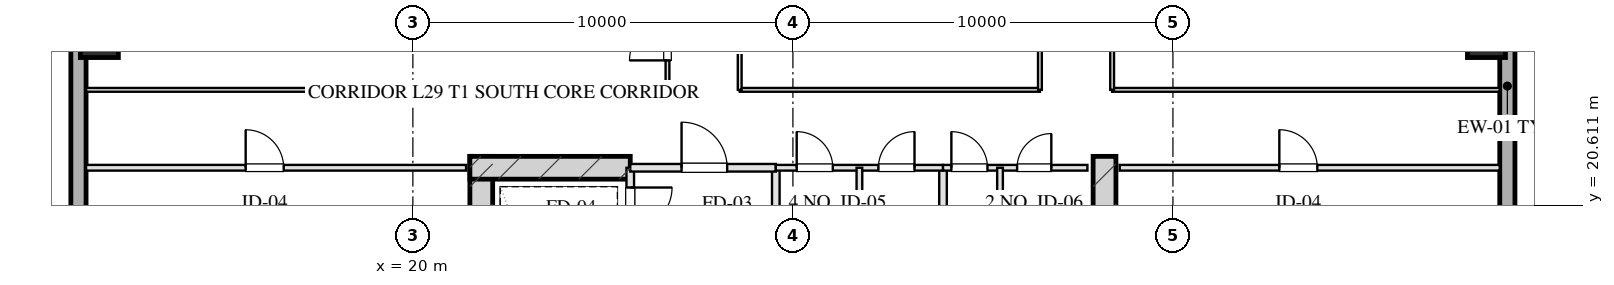
"""IFC4 building model, lengths in metres.
Left out: names, types, materials, properties, quantities, classifications, styles, units other than length and angle.
Written with IfcOpenShell. Run it as: python <this file> out.ifc"""

import sys

from ifc_helpers import new_model, si_unit, direction, frame, frame_2d, origin, origin_2d, place, context, subcontext, project, spatial, rectangle, hollow_rectangle, extrude, element, fill, save


model = new_model("IFC4")
c1 = context("Model", 3, precision=1e-05, world=origin(), true_north=direction((0.0, 1.0)))
c2 = subcontext(c1, "Body", "Model", "MODEL_VIEW")
j1 = project(units=[si_unit("LENGTHUNIT", "METRE"), si_unit("PLANEANGLEUNIT", "RADIAN")], contexts=[c1])
p1 = place(None, origin())
s1 = spatial("IfcSite", under=j1, at=p1, CompositionType="ELEMENT")
p2 = place(p1, origin())
s2 = spatial("IfcBuilding", under=s1, at=p2, CompositionType="ELEMENT")
p3 = place(p2, frame((0.0, 0.0, 113.85)))
s3 = spatial("IfcBuildingStorey", under=s2, at=p3, CompositionType="ELEMENT", Elevation=113.85)
for number, where, z_axis, x_axis in (
    (1, (21.8, 21.9, 0.0), (0.0, 0.0, 1.0), (0.0, -1.0, 0.0)),
    (2, (38.2, 21.9, 0.0), (0.0, 0.0, 1.0), (0.0, -1.0, 0.0)),
):
    element("IfcWall", number, at=place(p3, frame(where, z_axis=z_axis, x_axis=x_axis)), inside=s3, PredefinedType="SHEAR", context=c2, shape_type="SweptSolid", body=[
        extrude(rectangle(XDim=9.48, YDim=0.6, at=frame_2d((4.74, 0.0))), origin(), (0.0, 0.0, 1.0), 3.45),
    ])
p4 = place(p3, frame((21.5, 21.6, 0.0), z_axis=(0.0, 0.0, 1.0), x_axis=(1.0, 0.0, 0.0)))
e3 = element("IfcWall", 3, at=p4, inside=s3, PredefinedType="SHEAR", context=c2, shape_type="SweptSolid", body=[
    extrude(rectangle(XDim=4.22, YDim=0.6, at=frame_2d((2.11, 0.0))), origin(), (0.0, 0.0, 1.0), 3.45),
])
for number, where, z_axis, x_axis in (
    (4, (11.75, 25.0, 0.0), (0.0, 0.0, 1.0), (1.0, 0.0, 0.0)),
    (5, (48.25, 25.0, 0.0), (0.0, 0.0, 1.0), (1.0, 0.0, 0.0)),
):
    element("IfcColumn", number, at=place(p3, frame(where, z_axis=z_axis, x_axis=x_axis)), inside=s3, PredefinedType="COLUMN", context=c2, shape_type="SweptSolid", body=[
        extrude(hollow_rectangle(XDim=1.0, YDim=1.0, WallThickness=0.036, at=origin_2d()), origin(), (0.0, 0.0, 1.0), 3.451),
    ])
p5 = place(p3, frame((11.2, 9.0, 0.0), z_axis=(0.0, 0.0, 1.0), x_axis=(0.0, 1.0, 0.0)))
e6 = element("IfcWall", 6, at=p5, inside=s3, PredefinedType="SOLIDWALL", context=c2, shape_type="SweptSolid", body=[
    extrude(rectangle(XDim=50.0, YDim=0.4, at=frame_2d((25.0, 0.0))), origin(), (0.0, 0.0, 1.0), 2.61),
])
p6 = place(p5, frame((27.336, 0.0, 0.0)))
e7 = element("IfcOpeningElement", 7, at=p6, cuts=e6, PredefinedType="OPENING", context=c2, shape_type="SweptSolid", body=[
    extrude(rectangle(XDim=1.1, YDim=2.15, at=frame_2d((0.55, 1.075))), frame((0.0, 0.21, 0.0), z_axis=(0.0, -1.0, 0.0), x_axis=(1.0, 0.0, 0.0)), (0.0, 0.0, 1.0), 0.42),
])
p7 = place(p3, frame((48.8, 59.0, 0.0), z_axis=(0.0, 0.0, 1.0), x_axis=(0.0, -1.0, 0.0)))
e8 = element("IfcWall", 8, at=p7, inside=s3, PredefinedType="SOLIDWALL", context=c2, shape_type="SweptSolid", body=[
    extrude(rectangle(XDim=50.0, YDim=0.4, at=frame_2d((25.0, 0.0))), origin(), (0.0, 0.0, 1.0), 2.61),
])
p8 = place(p7, frame((30.2, 0.0, 0.75)))
e9 = element("IfcOpeningElement", 9, at=p8, cuts=e8, PredefinedType="OPENING", context=c2, shape_type="SweptSolid", body=[
    extrude(rectangle(XDim=2.4, YDim=1.46, at=frame_2d((1.2, 0.73))), frame((0.0, 0.21, 0.0), z_axis=(0.0, -1.0, 0.0), x_axis=(1.0, 0.0, 0.0)), (0.0, 0.0, 1.0), 0.42),
])
p9 = place(p7, frame((18.65, 0.0, 0.0)))
e10 = element("IfcOpeningElement", 10, at=p9, cuts=e8, PredefinedType="OPENING", context=c2, shape_type="SweptSolid", body=[
    extrude(rectangle(XDim=1.1, YDim=2.15, at=frame_2d((0.55, 1.075))), frame((0.0, 0.21, 0.0), z_axis=(0.0, -1.0, 0.0), x_axis=(1.0, 0.0, 0.0)), (0.0, 0.0, 1.0), 0.42),
])
p10 = place(p3, frame((25.72, 21.6, 0.0), z_axis=(0.0, 0.0, 1.0), x_axis=(0.0, -1.0, 0.0)))
e11 = element("IfcWall", 11, at=p10, inside=s3, PredefinedType="PARTITIONING", context=c2, shape_type="SweptSolid", body=[
    extrude(rectangle(XDim=1.9, YDim=0.2, at=frame_2d((0.95, 0.0))), origin(), (0.0, 0.0, 1.0), 3.175),
])
p11 = place(p10, frame((0.52, 0.0, 0.0)))
e12 = element("IfcOpeningElement", 12, at=p11, cuts=e11, PredefinedType="OPENING", context=c2, shape_type="SweptSolid", body=[
    extrude(rectangle(XDim=1.1, YDim=2.05, at=frame_2d((0.55, 1.025))), frame((0.0, 0.11, 0.0), z_axis=(0.0, -1.0, 0.0), x_axis=(1.0, 0.0, 0.0)), (0.0, 0.0, 1.0), 0.22),
])
p12 = place(p3, frame((29.55, 21.6, 0.0), z_axis=(0.0, 0.0, 1.0), x_axis=(0.0, -1.0, 0.0)))
e13 = element("IfcWall", 13, at=p12, inside=s3, PredefinedType="PARTITIONING", context=c2, shape_type="SweptSolid", body=[
    extrude(rectangle(XDim=8.43, YDim=0.2, at=frame_2d((4.215, 0.0))), origin(), (0.0, 0.0, 1.0), 3.175),
])
p13 = place(p3, frame((25.72, 21.6, 0.0), z_axis=(0.0, 0.0, 1.0), x_axis=(1.0, 0.0, 0.0)))
e14 = element("IfcWall", 14, at=p13, inside=s3, PredefinedType="PARTITIONING", context=c2, shape_type="SweptSolid", body=[
    extrude(rectangle(XDim=3.83, YDim=0.2, at=frame_2d((1.915, 0.0))), origin(), (0.0, 0.0, 1.0), 3.175),
])
p14 = place(p13, frame((1.35, 0.0, 0.0)))
e15 = element("IfcOpeningElement", 15, at=p14, cuts=e14, PredefinedType="OPENING", context=c2, shape_type="SweptSolid", body=[
    extrude(rectangle(XDim=1.2, YDim=2.05, at=frame_2d((0.6, 1.025))), frame((0.0, 0.11, 0.0), z_axis=(0.0, -1.0, 0.0), x_axis=(1.0, 0.0, 0.0)), (0.0, 0.0, 1.0), 0.22),
])
p15 = place(p3, frame((33.95, 21.6, 0.0), z_axis=(0.0, 0.0, 1.0), x_axis=(0.0, -1.0, 0.0)))
e16 = element("IfcWall", 16, at=p15, inside=s3, PredefinedType="PARTITIONING", context=c2, shape_type="SweptSolid", body=[
    extrude(rectangle(XDim=8.43, YDim=0.2, at=frame_2d((4.215, 0.0))), origin(), (0.0, 0.0, 1.0), 3.175),
])
p16 = place(p3, frame((29.55, 21.6, 0.0), z_axis=(0.0, 0.0, 1.0), x_axis=(1.0, 0.0, 0.0)))
e17 = element("IfcWall", 17, at=p16, inside=s3, PredefinedType="PARTITIONING", context=c2, shape_type="SweptSolid", body=[
    extrude(rectangle(XDim=4.4, YDim=0.15, at=frame_2d((2.2, 0.0))), origin(), (0.0, 0.0, 1.0), 3.175),
])
p17 = place(p16, frame((0.55, 0.0, 0.0)))
e18 = element("IfcOpeningElement", 18, at=p17, cuts=e17, PredefinedType="OPENING", context=c2, shape_type="SweptSolid", body=[
    extrude(rectangle(XDim=0.95, YDim=2.05, at=frame_2d((0.475, 1.025))), frame((0.0, 0.085, 0.0), z_axis=(0.0, -1.0, 0.0), x_axis=(1.0, 0.0, 0.0)), (0.0, 0.0, 1.0), 0.17),
])
p18 = place(p16, frame((2.7, 0.0, 0.0)))
e19 = element("IfcOpeningElement", 19, at=p18, cuts=e17, PredefinedType="OPENING", context=c2, shape_type="SweptSolid", body=[
    extrude(rectangle(XDim=0.95, YDim=2.05, at=frame_2d((0.475, 1.025))), frame((0.0, 0.085, 0.0), z_axis=(0.0, -1.0, 0.0), x_axis=(1.0, 0.0, 0.0)), (0.0, 0.0, 1.0), 0.17),
])
p19 = place(p3, frame((31.75, 21.6, 0.0), z_axis=(0.0, 0.0, 1.0), x_axis=(0.0, -1.0, 0.0)))
e20 = element("IfcWall", 20, at=p19, inside=s3, PredefinedType="PARTITIONING", context=c2, shape_type="SweptSolid", body=[
    extrude(rectangle(XDim=8.43, YDim=0.15, at=frame_2d((4.215, 0.0))), origin(), (0.0, 0.0, 1.0), 3.175),
])
p20 = place(p3, frame((33.95, 21.6, 0.0), z_axis=(0.0, 0.0, 1.0), x_axis=(1.0, 0.0, 0.0)))
e21 = element("IfcWall", 21, at=p20, inside=s3, PredefinedType="PARTITIONING", context=c2, shape_type="SweptSolid", body=[
    extrude(rectangle(XDim=3.8, YDim=0.15, at=frame_2d((1.9, 0.0))), origin(), (0.0, 0.0, 1.0), 3.175),
])
p21 = place(p20, frame((0.22, 0.0, 0.0)))
e22 = element("IfcOpeningElement", 22, at=p21, cuts=e21, PredefinedType="OPENING", context=c2, shape_type="SweptSolid", body=[
    extrude(rectangle(XDim=0.95, YDim=2.05, at=frame_2d((0.475, 1.025))), frame((0.0, 0.085, 0.0), z_axis=(0.0, -1.0, 0.0), x_axis=(1.0, 0.0, 0.0)), (0.0, 0.0, 1.0), 0.17),
])
p22 = place(p20, frame((1.95, 0.0, 0.0)))
e23 = element("IfcOpeningElement", 23, at=p22, cuts=e21, PredefinedType="OPENING", context=c2, shape_type="SweptSolid", body=[
    extrude(rectangle(XDim=0.9, YDim=2.05, at=frame_2d((0.45, 1.025))), frame((0.0, 0.085, 0.0), z_axis=(0.0, -1.0, 0.0), x_axis=(1.0, 0.0, 0.0)), (0.0, 0.0, 1.0), 0.17),
])
p23 = place(p3, frame((35.45, 21.6, 0.0), z_axis=(0.0, 0.0, 1.0), x_axis=(0.0, -1.0, 0.0)))
e24 = element("IfcWall", 24, at=p23, inside=s3, PredefinedType="PARTITIONING", context=c2, shape_type="SweptSolid", body=[
    extrude(rectangle(XDim=8.43, YDim=0.15, at=frame_2d((4.215, 0.0))), origin(), (0.0, 0.0, 1.0), 2.815),
])
p24 = place(p23, frame((2.55, 0.0, 0.0)))
e25 = element("IfcOpeningElement", 25, at=p24, cuts=e24, PredefinedType="OPENING", context=c2, shape_type="SweptSolid", body=[
    extrude(rectangle(XDim=0.95, YDim=2.05, at=frame_2d((0.475, 1.025))), frame((0.0, 0.085, 0.0), z_axis=(0.0, -1.0, 0.0), x_axis=(1.0, 0.0, 0.0)), (0.0, 0.0, 1.0), 0.17),
])
p25 = place(p23, frame((5.6, 0.0, 0.0)))
e26 = element("IfcOpeningElement", 26, at=p25, cuts=e24, PredefinedType="OPENING", context=c2, shape_type="SweptSolid", body=[
    extrude(rectangle(XDim=0.9, YDim=2.05, at=frame_2d((0.45, 1.025))), frame((0.0, 0.085, 0.0), z_axis=(0.0, -1.0, 0.0), x_axis=(1.0, 0.0, 0.0)), (0.0, 0.0, 1.0), 0.17),
])
p26 = place(p3, frame((11.4, 21.6, 0.0), z_axis=(0.0, 0.0, 1.0), x_axis=(1.0, 0.0, 0.0)))
e27 = element("IfcWall", 27, at=p26, inside=s3, PredefinedType="PARTITIONING", context=c2, shape_type="SweptSolid", body=[
    extrude(rectangle(XDim=10.0, YDim=0.15, at=frame_2d((5.0, 0.0))), origin(), (0.0, 0.0, 1.0), 3.175),
])
p27 = place(p26, frame((4.2, 0.0, 0.0)))
e28 = element("IfcOpeningElement", 28, at=p27, cuts=e27, PredefinedType="OPENING", context=c2, shape_type="SweptSolid", body=[
    extrude(rectangle(XDim=1.0, YDim=2.05, at=frame_2d((0.5, 1.025))), frame((0.0, 0.085, 0.0), z_axis=(0.0, -1.0, 0.0), x_axis=(1.0, 0.0, 0.0)), (0.0, 0.0, 1.0), 0.17),
])
p28 = place(p3, frame((38.6, 21.6, 0.0), z_axis=(0.0, 0.0, 1.0), x_axis=(1.0, 0.0, 0.0)))
e29 = element("IfcWall", 29, at=p28, inside=s3, PredefinedType="PARTITIONING", context=c2, shape_type="SweptSolid", body=[
    extrude(rectangle(XDim=10.0, YDim=0.15, at=frame_2d((5.0, 0.0))), origin(), (0.0, 0.0, 1.0), 3.175),
])
p29 = place(p28, frame((4.2, 0.0, 0.0)))
e30 = element("IfcOpeningElement", 30, at=p29, cuts=e29, PredefinedType="OPENING", context=c2, shape_type="SweptSolid", body=[
    extrude(rectangle(XDim=1.0, YDim=2.05, at=frame_2d((0.5, 1.025))), frame((0.0, 0.085, 0.0), z_axis=(0.0, -1.0, 0.0), x_axis=(1.0, 0.0, 0.0)), (0.0, 0.0, 1.0), 0.17),
])
p30 = place(p3, frame((11.4, 23.65, 0.0), z_axis=(0.0, 0.0, 1.0), x_axis=(1.0, 0.0, 0.0)))
e31 = element("IfcWall", 31, at=p30, inside=s3, PredefinedType="MOVABLE", context=c2, shape_type="SweptSolid", body=[
    extrude(rectangle(XDim=15.3, YDim=0.1, at=frame_2d((7.65, 0.0))), origin(), (0.0, 0.0, 1.0), 3.175),
])
p31 = place(p3, frame((28.6, 23.65, 0.0), z_axis=(0.0, 0.0, 1.0), x_axis=(1.0, 0.0, 0.0)))
e32 = element("IfcWall", 32, at=p31, inside=s3, PredefinedType="MOVABLE", context=c2, shape_type="SweptSolid", body=[
    extrude(rectangle(XDim=7.9, YDim=0.1, at=frame_2d((3.95, 0.0))), origin(), (0.0, 0.0, 1.0), 3.175),
])
p32 = place(p3, frame((38.4, 23.65, 0.0), z_axis=(0.0, 0.0, 1.0), x_axis=(1.0, 0.0, 0.0)))
e33 = element("IfcWall", 33, at=p32, inside=s3, PredefinedType="MOVABLE", context=c2, shape_type="SweptSolid", body=[
    extrude(rectangle(XDim=10.2, YDim=0.1, at=frame_2d((5.1, 0.0))), origin(), (0.0, 0.0, 1.0), 3.175),
])
p33 = place(p3, frame((26.7, 23.65, 0.0), z_axis=(0.0, 0.0, 1.0), x_axis=(0.0, 1.0, 0.0)))
e34 = element("IfcWall", 34, at=p33, inside=s3, PredefinedType="MOVABLE", context=c2, shape_type="SweptSolid", body=[
    extrude(rectangle(XDim=20.7, YDim=0.1, at=frame_2d((10.35, 0.0))), origin(), (0.0, 0.0, 1.0), 3.175),
])
p34 = place(p33, frame((0.775, 0.0, 0.0)))
e35 = element("IfcOpeningElement", 35, at=p34, cuts=e34, PredefinedType="OPENING", context=c2, shape_type="SweptSolid", body=[
    extrude(rectangle(XDim=1.0, YDim=2.05, at=frame_2d((0.5, 1.025))), frame((0.0, 0.06, 0.0), z_axis=(0.0, -1.0, 0.0), x_axis=(1.0, 0.0, 0.0)), (0.0, 0.0, 1.0), 0.12),
])
p35 = place(p33, frame((3.95, 0.0, 0.0)))
e36 = element("IfcOpeningElement", 36, at=p35, cuts=e34, PredefinedType="OPENING", context=c2, shape_type="SweptSolid", body=[
    extrude(rectangle(XDim=1.0, YDim=2.05, at=frame_2d((0.5, 1.025))), frame((0.0, 0.06, 0.0), z_axis=(0.0, -1.0, 0.0), x_axis=(1.0, 0.0, 0.0)), (0.0, 0.0, 1.0), 0.12),
])
p36 = place(p33, frame((8.273, 0.0, 0.0)))
e37 = element("IfcOpeningElement", 37, at=p36, cuts=e34, PredefinedType="OPENING", context=c2, shape_type="SweptSolid", body=[
    extrude(rectangle(XDim=1.0, YDim=2.05, at=frame_2d((0.5, 1.025))), frame((0.0, 0.06, 0.0), z_axis=(0.0, -1.0, 0.0), x_axis=(1.0, 0.0, 0.0)), (0.0, 0.0, 1.0), 0.12),
])
p37 = place(p33, frame((12.559, 0.0, 0.0)))
e38 = element("IfcOpeningElement", 38, at=p37, cuts=e34, PredefinedType="OPENING", context=c2, shape_type="SweptSolid", body=[
    extrude(rectangle(XDim=0.85, YDim=2.05, at=frame_2d((0.425, 1.025))), frame((0.0, 0.06, 0.0), z_axis=(0.0, -1.0, 0.0), x_axis=(1.0, 0.0, 0.0)), (0.0, 0.0, 1.0), 0.12),
])
p38 = place(p33, frame((16.078, 0.0, 0.0)))
e39 = element("IfcOpeningElement", 39, at=p38, cuts=e34, PredefinedType="OPENING", context=c2, shape_type="SweptSolid", body=[
    extrude(rectangle(XDim=1.0, YDim=2.05, at=frame_2d((0.5, 1.025))), frame((0.0, 0.06, 0.0), z_axis=(0.0, -1.0, 0.0), x_axis=(1.0, 0.0, 0.0)), (0.0, 0.0, 1.0), 0.12),
])
p39 = place(p33, frame((18.967, 0.0, 0.0)))
e40 = element("IfcOpeningElement", 40, at=p39, cuts=e34, PredefinedType="OPENING", context=c2, shape_type="SweptSolid", body=[
    extrude(rectangle(XDim=1.0, YDim=2.05, at=frame_2d((0.5, 1.025))), frame((0.0, 0.06, 0.0), z_axis=(0.0, -1.0, 0.0), x_axis=(1.0, 0.0, 0.0)), (0.0, 0.0, 1.0), 0.12),
])
p40 = place(p3, frame((28.6, 23.65, 0.0), z_axis=(0.0, 0.0, 1.0), x_axis=(0.0, 1.0, 0.0)))
e41 = element("IfcWall", 41, at=p40, inside=s3, PredefinedType="MOVABLE", context=c2, shape_type="SweptSolid", body=[
    extrude(rectangle(XDim=20.7, YDim=0.1, at=frame_2d((10.35, 0.0))), origin(), (0.0, 0.0, 1.0), 3.175),
])
p41 = place(p40, frame((5.198, 0.0, 0.0)))
e42 = element("IfcOpeningElement", 42, at=p41, cuts=e41, PredefinedType="OPENING", context=c2, shape_type="SweptSolid", body=[
    extrude(rectangle(XDim=1.1, YDim=2.05, at=frame_2d((0.55, 1.025))), frame((0.0, 0.06, 0.0), z_axis=(0.0, -1.0, 0.0), x_axis=(1.0, 0.0, 0.0)), (0.0, 0.0, 1.0), 0.12),
])
p42 = place(p40, frame((15.667, 0.0, 0.0)))
e43 = element("IfcOpeningElement", 43, at=p42, cuts=e41, PredefinedType="OPENING", context=c2, shape_type="SweptSolid", body=[
    extrude(rectangle(XDim=1.1, YDim=2.05, at=frame_2d((0.55, 1.025))), frame((0.0, 0.06, 0.0), z_axis=(0.0, -1.0, 0.0), x_axis=(1.0, 0.0, 0.0)), (0.0, 0.0, 1.0), 0.12),
])
p43 = place(p3, frame((36.5, 23.65, 0.0), z_axis=(0.0, 0.0, 1.0), x_axis=(0.0, 1.0, 0.0)))
e44 = element("IfcWall", 44, at=p43, inside=s3, PredefinedType="MOVABLE", context=c2, shape_type="SweptSolid", body=[
    extrude(rectangle(XDim=20.7, YDim=0.1, at=frame_2d((10.35, 0.0))), origin(), (0.0, 0.0, 1.0), 3.175),
])
p44 = place(p3, frame((38.4, 23.65, 0.0), z_axis=(0.0, 0.0, 1.0), x_axis=(0.0, 1.0, 0.0)))
e45 = element("IfcWall", 45, at=p44, inside=s3, PredefinedType="MOVABLE", context=c2, shape_type="SweptSolid", body=[
    extrude(rectangle(XDim=20.7, YDim=0.1, at=frame_2d((10.35, 0.0))), origin(), (0.0, 0.0, 1.0), 3.175),
])
p45 = place(p44, frame((2.699, 0.0, 0.0)))
e46 = element("IfcOpeningElement", 46, at=p45, cuts=e45, PredefinedType="OPENING", context=c2, shape_type="SweptSolid", body=[
    extrude(rectangle(XDim=1.0, YDim=2.05, at=frame_2d((0.5, 1.025))), frame((0.0, 0.06, 0.0), z_axis=(0.0, -1.0, 0.0), x_axis=(1.0, 0.0, 0.0)), (0.0, 0.0, 1.0), 0.12),
])
p46 = place(p44, frame((9.875, 0.0, 0.0)))
e47 = element("IfcOpeningElement", 47, at=p46, cuts=e45, PredefinedType="OPENING", context=c2, shape_type="SweptSolid", body=[
    extrude(rectangle(XDim=1.0, YDim=2.05, at=frame_2d((0.5, 1.025))), frame((0.0, 0.06, 0.0), z_axis=(0.0, -1.0, 0.0), x_axis=(1.0, 0.0, 0.0)), (0.0, 0.0, 1.0), 0.12),
])
p47 = place(p44, frame((17.025, 0.0, 0.0)))
e48 = element("IfcOpeningElement", 48, at=p47, cuts=e45, PredefinedType="OPENING", context=c2, shape_type="SweptSolid", body=[
    extrude(rectangle(XDim=1.0, YDim=2.05, at=frame_2d((0.5, 1.025))), frame((0.0, 0.06, 0.0), z_axis=(0.0, -1.0, 0.0), x_axis=(1.0, 0.0, 0.0)), (0.0, 0.0, 1.0), 0.12),
])
p48 = place(p11, origin())
e49 = element("IfcDoor", 49, at=p48, inside=s3, OperationType="SINGLE_SWING_LEFT", PredefinedType="DOOR", context=c2, shape_type="SweptSolid", body=[
    extrude(rectangle(XDim=1.1, YDim=2.05, at=frame_2d((0.55, 1.025))), frame((0.0, 0.025, 0.0), z_axis=(0.0, -1.0, 0.0), x_axis=(1.0, 0.0, 0.0)), (0.0, 0.0, 1.0), 0.05),
])
fill(e12, e49)
p49 = place(p14, origin())
e50 = element("IfcDoor", 50, at=p49, inside=s3, OperationType="SINGLE_SWING_LEFT", PredefinedType="DOOR", context=c2, shape_type="SweptSolid", body=[
    extrude(rectangle(XDim=1.2, YDim=2.05, at=frame_2d((0.6, 1.025))), frame((0.0, 0.025, 0.0), z_axis=(0.0, -1.0, 0.0), x_axis=(1.0, 0.0, 0.0)), (0.0, 0.0, 1.0), 0.05),
])
fill(e15, e50)
p50 = place(p17, origin())
e51 = element("IfcDoor", 51, at=p50, inside=s3, OperationType="SINGLE_SWING_LEFT", PredefinedType="DOOR", context=c2, shape_type="SweptSolid", body=[
    extrude(rectangle(XDim=0.95, YDim=2.05, at=frame_2d((0.475, 1.025))), frame((0.0, 0.025, 0.0), z_axis=(0.0, -1.0, 0.0), x_axis=(1.0, 0.0, 0.0)), (0.0, 0.0, 1.0), 0.05),
])
fill(e18, e51)
p51 = place(p18, origin())
e52 = element("IfcDoor", 52, at=p51, inside=s3, OperationType="SINGLE_SWING_RIGHT", PredefinedType="DOOR", context=c2, shape_type="SweptSolid", body=[
    extrude(rectangle(XDim=0.95, YDim=2.05, at=frame_2d((0.475, 1.025))), frame((0.0, 0.025, 0.0), z_axis=(0.0, -1.0, 0.0), x_axis=(1.0, 0.0, 0.0)), (0.0, 0.0, 1.0), 0.05),
])
fill(e19, e52)
p52 = place(p21, origin())
e53 = element("IfcDoor", 53, at=p52, inside=s3, OperationType="SINGLE_SWING_LEFT", PredefinedType="DOOR", context=c2, shape_type="SweptSolid", body=[
    extrude(rectangle(XDim=0.95, YDim=2.05, at=frame_2d((0.475, 1.025))), frame((0.0, 0.025, 0.0), z_axis=(0.0, -1.0, 0.0), x_axis=(1.0, 0.0, 0.0)), (0.0, 0.0, 1.0), 0.05),
])
fill(e22, e53)
p53 = place(p22, origin())
e54 = element("IfcDoor", 54, at=p53, inside=s3, OperationType="SINGLE_SWING_RIGHT", PredefinedType="DOOR", context=c2, shape_type="SweptSolid", body=[
    extrude(rectangle(XDim=0.9, YDim=2.05, at=frame_2d((0.45, 1.025))), frame((0.0, 0.025, 0.0), z_axis=(0.0, -1.0, 0.0), x_axis=(1.0, 0.0, 0.0)), (0.0, 0.0, 1.0), 0.05),
])
fill(e23, e54)
p54 = place(p27, origin())
e55 = element("IfcDoor", 55, at=p54, inside=s3, OperationType="SINGLE_SWING_LEFT", PredefinedType="DOOR", context=c2, shape_type="SweptSolid", body=[
    extrude(rectangle(XDim=1.0, YDim=2.05, at=frame_2d((0.5, 1.025))), frame((0.0, 0.025, 0.0), z_axis=(0.0, -1.0, 0.0), x_axis=(1.0, 0.0, 0.0)), (0.0, 0.0, 1.0), 0.05),
])
fill(e28, e55)
p55 = place(p29, origin())
e56 = element("IfcDoor", 56, at=p55, inside=s3, OperationType="SINGLE_SWING_LEFT", PredefinedType="DOOR", context=c2, shape_type="SweptSolid", body=[
    extrude(rectangle(XDim=1.0, YDim=2.05, at=frame_2d((0.5, 1.025))), frame((0.0, 0.025, 0.0), z_axis=(0.0, -1.0, 0.0), x_axis=(1.0, 0.0, 0.0)), (0.0, 0.0, 1.0), 0.05),
])
fill(e30, e56)
p56 = place(p34, origin())
e57 = element("IfcDoor", 57, at=p56, inside=s3, OperationType="SINGLE_SWING_LEFT", PredefinedType="DOOR", context=c2, shape_type="SweptSolid", body=[
    extrude(rectangle(XDim=1.0, YDim=2.05, at=frame_2d((0.5, 1.025))), frame((0.0, 0.025, 0.0), z_axis=(0.0, -1.0, 0.0), x_axis=(1.0, 0.0, 0.0)), (0.0, 0.0, 1.0), 0.05),
])
fill(e35, e57)
save(model, sys.argv[1])
